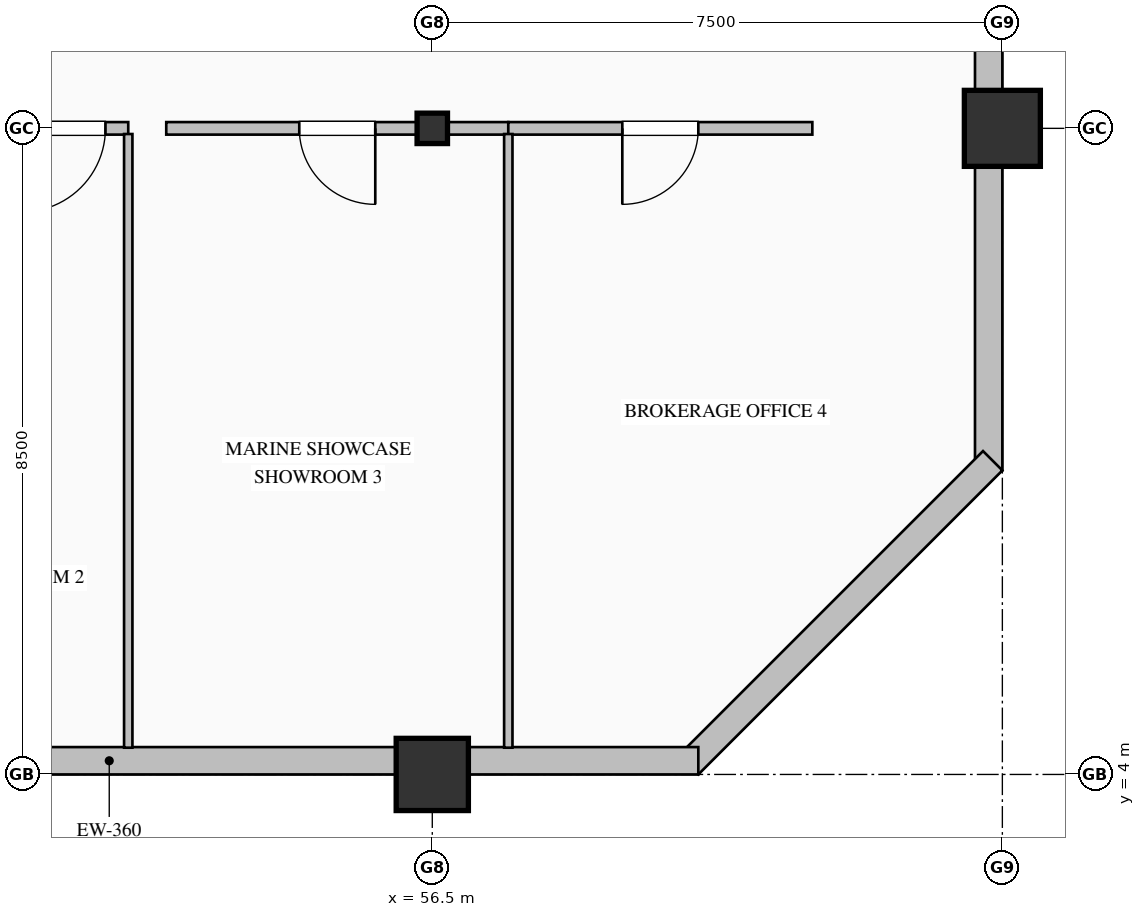
"""IFC4 building model, lengths in metres.
Left out: names, types, materials, properties, quantities, classifications, styles, units other than length and angle.
Written with IfcOpenShell. Run it as: python <this file> out.ifc"""

import sys

from ifc_helpers import new_model, si_unit, direction, frame, frame_2d, origin, origin_2d, place, context, subcontext, project, spatial, rectangle, hollow_rectangle, hollow_circle, i_section, extrude, element, fill, save


model = new_model("IFC4")
c1 = context("Model", 3, precision=1e-05, world=origin(), true_north=direction((0.0, 1.0)))
c2 = subcontext(c1, "Body", "Model", "MODEL_VIEW")
j1 = project(units=[si_unit("LENGTHUNIT", "METRE"), si_unit("PLANEANGLEUNIT", "RADIAN")], contexts=[c1])
p1 = place(None, origin())
s1 = spatial("IfcSite", under=j1, at=p1, CompositionType="ELEMENT")
p2 = place(p1, origin())
s2 = spatial("IfcBuilding", under=s1, at=p2, CompositionType="ELEMENT")
p3 = place(p2, frame((0.0, 0.0, 179.0)))
s3 = spatial("IfcBuildingStorey", under=s2, at=p3, CompositionType="ELEMENT", Elevation=179.0)
p4 = place(p3, frame((56.5, 4.0, 0.0), z_axis=(0.0, 0.0, 1.0), x_axis=(1.0, 0.0, 0.0)))
e1 = element("IfcColumn", 1, at=p4, inside=s3, PredefinedType="COLUMN", context=c2, shape_type="SweptSolid", body=[
    extrude(hollow_rectangle(XDim=0.95, YDim=0.95, WallThickness=0.036, at=origin_2d()), origin(), (0.0, 0.0, 1.0), 4.0),
])
p5 = place(p3, frame((56.5, 12.5, 0.0), z_axis=(0.0, 0.0, 1.0), x_axis=(1.0, 0.0, 0.0)))
e2 = element("IfcColumn", 2, at=p5, inside=s3, PredefinedType="COLUMN", context=c2, shape_type="SweptSolid", body=[
    extrude(i_section(OverallWidth=0.4, OverallDepth=0.4, WebThickness=0.013, FlangeThickness=0.021, FilletRadius=0.022, at=origin_2d()), origin(), (0.0, 0.0, 1.0), 4.0),
])
p6 = place(p3, frame((64.0, 12.5, 0.0), z_axis=(0.0, 0.0, 1.0), x_axis=(1.0, 0.0, 0.0)))
e3 = element("IfcColumn", 3, at=p6, inside=s3, PredefinedType="COLUMN", context=c2, shape_type="SweptSolid", body=[
    extrude(hollow_circle(Radius=0.5, WallThickness=0.036, at=origin_2d()), origin(), (0.0, 0.0, 1.0), 4.0),
])
p7 = place(p3, frame((63.82, 36.05, 0.0), z_axis=(0.0, 0.0, 1.0), x_axis=(0.0, -1.0, 0.0)))
e4 = element("IfcWall", 4, at=p7, inside=s3, PredefinedType="SOLIDWALL", context=c2, shape_type="SweptSolid", body=[
    extrude(rectangle(XDim=28.05, YDim=0.36, at=frame_2d((14.025, 0.0))), origin(), (0.0, 0.0, 1.0), 3.265),
])
p8 = place(p7, frame((2.775, 0.0, 0.85)))
e5 = element("IfcOpeningElement", 5, at=p8, cuts=e4, PredefinedType="OPENING", context=c2, shape_type="SweptSolid", body=[
    extrude(rectangle(XDim=1.65, YDim=1.95, at=frame_2d((0.825, 0.975))), frame((0.0, 0.19, 0.0), z_axis=(0.0, -1.0, 0.0), x_axis=(1.0, 0.0, 0.0)), (0.0, 0.0, 1.0), 0.38),
])
p9 = place(p7, frame((13.575, 0.0, 0.85)))
e6 = element("IfcOpeningElement", 6, at=p9, cuts=e4, PredefinedType="OPENING", context=c2, shape_type="SweptSolid", body=[
    extrude(rectangle(XDim=1.65, YDim=1.95, at=frame_2d((0.825, 0.975))), frame((0.0, 0.19, 0.0), z_axis=(0.0, -1.0, 0.0), x_axis=(1.0, 0.0, 0.0)), (0.0, 0.0, 1.0), 0.38),
])
p10 = place(p3, frame((63.873, 8.127, 0.0), z_axis=(0.0, 0.0, 1.0), x_axis=(-0.707106781187, -0.707106781187, 0.0)))
e7 = element("IfcWall", 7, at=p10, inside=s3, PredefinedType="SOLIDWALL", context=c2, shape_type="SweptSolid", body=[
    extrude(rectangle(XDim=5.657, YDim=0.36, at=frame_2d((2.828, 0.0))), origin(), (0.0, 0.0, 1.0), 3.765),
])
p11 = place(p3, frame((60.0, 4.18, 0.0), z_axis=(0.0, 0.0, 1.0), x_axis=(-1.0, 0.0, 0.0)))
e8 = element("IfcWall", 8, at=p11, inside=s3, PredefinedType="SOLIDWALL", context=c2, shape_type="SweptSolid", body=[
    extrude(rectangle(XDim=15.5, YDim=0.36, at=frame_2d((7.75, 0.0))), origin(), (0.0, 0.0, 1.0), 3.265),
])
p12 = place(p3, frame((52.5, 12.5, 0.0), z_axis=(0.0, 0.0, 1.0), x_axis=(-1.0, 0.0, 0.0)))
e9 = element("IfcWall", 9, at=p12, inside=s3, PredefinedType="PARTITIONING", context=c2, shape_type="SweptSolid", body=[
    extrude(rectangle(XDim=1.7, YDim=0.165, at=frame_2d((0.85, 0.0))), origin(), (0.0, 0.0, 1.0), 3.157),
])
p13 = place(p12, frame((0.3, 0.0, 0.0)))
e10 = element("IfcOpeningElement", 10, at=p13, cuts=e9, PredefinedType="OPENING", context=c2, shape_type="SweptSolid", body=[
    extrude(rectangle(XDim=1.1, YDim=2.2, at=frame_2d((0.55, 1.1))), frame((0.0, 0.093, 0.0), z_axis=(0.0, -1.0, 0.0), x_axis=(1.0, 0.0, 0.0)), (0.0, 0.0, 1.0), 0.185),
])
p14 = place(p3, frame((57.5, 12.5, 0.0), z_axis=(0.0, 0.0, 1.0), x_axis=(-1.0, 0.0, 0.0)))
e11 = element("IfcWall", 11, at=p14, inside=s3, PredefinedType="PARTITIONING", context=c2, shape_type="SweptSolid", body=[
    extrude(rectangle(XDim=4.5, YDim=0.165, at=frame_2d((2.25, 0.0))), origin(), (0.0, 0.0, 1.0), 3.157),
])
p15 = place(p14, frame((1.75, 0.0, 0.0)))
e12 = element("IfcOpeningElement", 12, at=p15, cuts=e11, PredefinedType="OPENING", context=c2, shape_type="SweptSolid", body=[
    extrude(rectangle(XDim=1.0, YDim=2.15, at=frame_2d((0.5, 1.075))), frame((0.0, 0.093, 0.0), z_axis=(0.0, -1.0, 0.0), x_axis=(1.0, 0.0, 0.0)), (0.0, 0.0, 1.0), 0.185),
])
p16 = place(p3, frame((61.5, 12.5, 0.0), z_axis=(0.0, 0.0, 1.0), x_axis=(-1.0, 0.0, 0.0)))
e13 = element("IfcWall", 13, at=p16, inside=s3, PredefinedType="PARTITIONING", context=c2, shape_type="SweptSolid", body=[
    extrude(rectangle(XDim=4.0, YDim=0.165, at=frame_2d((2.0, 0.0))), origin(), (0.0, 0.0, 1.0), 3.157),
])
p17 = place(p16, frame((1.5, 0.0, 0.0)))
e14 = element("IfcOpeningElement", 14, at=p17, cuts=e13, PredefinedType="OPENING", context=c2, shape_type="SweptSolid", body=[
    extrude(rectangle(XDim=1.0, YDim=2.15, at=frame_2d((0.5, 1.075))), frame((0.0, 0.093, 0.0), z_axis=(0.0, -1.0, 0.0), x_axis=(1.0, 0.0, 0.0)), (0.0, 0.0, 1.0), 0.185),
])
for number, where, z_axis, x_axis in (
    (15, (52.5, 12.426, 0.0), (0.0, 0.0, 1.0), (0.0, -1.0, 0.0)),
    (16, (57.5, 12.426, 0.0), (0.0, 0.0, 1.0), (0.0, -1.0, 0.0)),
):
    element("IfcWall", number, at=place(p3, frame(where, z_axis=z_axis, x_axis=x_axis)), inside=s3, PredefinedType="MOVABLE", context=c2, shape_type="SweptSolid", body=[
        extrude(rectangle(XDim=8.073, YDim=0.11, at=frame_2d((4.037, 0.0))), origin(), (0.0, 0.0, 1.0), 3.765),
    ])
p18 = place(p13, origin())
e17 = element("IfcDoor", 17, at=p18, inside=s3, OperationType="SINGLE_SWING_RIGHT", PredefinedType="DOOR", context=c2, shape_type="SweptSolid", body=[
    extrude(rectangle(XDim=1.1, YDim=2.2, at=frame_2d((0.55, 1.1))), frame((0.0, 0.025, 0.0), z_axis=(0.0, -1.0, 0.0), x_axis=(1.0, 0.0, 0.0)), (0.0, 0.0, 1.0), 0.05),
])
fill(e10, e17)
p19 = place(p15, origin())
e18 = element("IfcDoor", 18, at=p19, inside=s3, OperationType="SINGLE_SWING_LEFT", PredefinedType="DOOR", context=c2, shape_type="SweptSolid", body=[
    extrude(rectangle(XDim=1.0, YDim=2.15, at=frame_2d((0.5, 1.075))), frame((0.0, 0.025, 0.0), z_axis=(0.0, -1.0, 0.0), x_axis=(1.0, 0.0, 0.0)), (0.0, 0.0, 1.0), 0.05),
])
fill(e12, e18)
p20 = place(p17, origin())
e19 = element("IfcDoor", 19, at=p20, inside=s3, OperationType="SINGLE_SWING_RIGHT", PredefinedType="DOOR", context=c2, shape_type="SweptSolid", body=[
    extrude(rectangle(XDim=1.0, YDim=2.15, at=frame_2d((0.5, 1.075))), frame((0.0, 0.025, 0.0), z_axis=(0.0, -1.0, 0.0), x_axis=(1.0, 0.0, 0.0)), (0.0, 0.0, 1.0), 0.05),
])
fill(e14, e19)
save(model, sys.argv[1])
